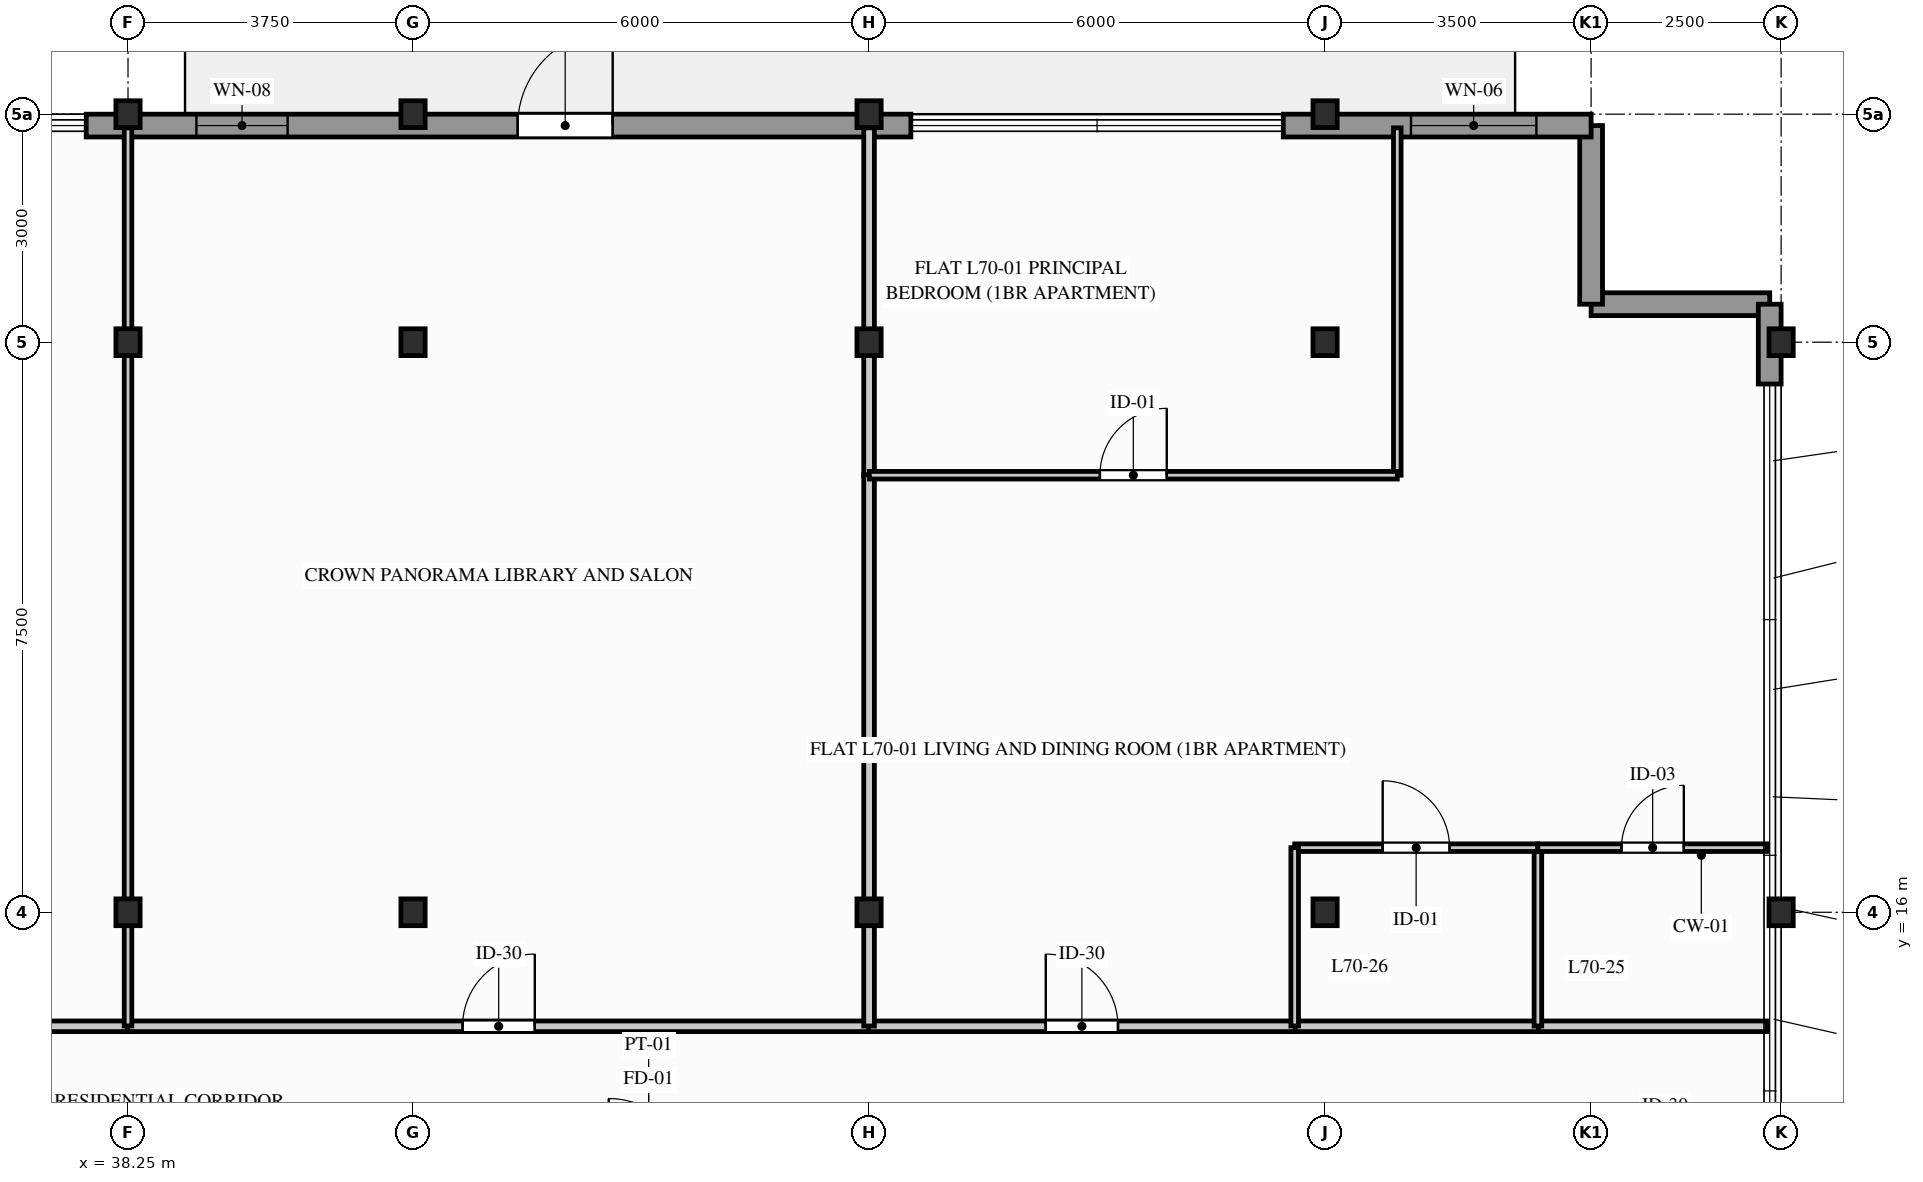
"""IFC4 building model, lengths in metres.
Left out: names, types, materials, properties, quantities, classifications, styles, units other than length and angle.
Written with IfcOpenShell. Run it as: python <this file> out.ifc"""

import sys

from ifc_helpers import new_model, si_unit, direction, frame, frame_2d, origin, origin_2d, place, context, subcontext, project, spatial, rectangle, i_section, extrude, element, fill, save


model = new_model("IFC4")
c1 = context("Model", 3, precision=1e-05, world=origin(), true_north=direction((0.0, 1.0)))
c2 = subcontext(c1, "Body", "Model", "MODEL_VIEW")
j1 = project(units=[si_unit("LENGTHUNIT", "METRE"), si_unit("PLANEANGLEUNIT", "RADIAN")], contexts=[c1])
p1 = place(None, origin())
s1 = spatial("IfcSite", under=j1, at=p1, CompositionType="ELEMENT")
p2 = place(p1, origin())
s2 = spatial("IfcBuilding", under=s1, at=p2, CompositionType="ELEMENT")
p3 = place(p2, frame((0.0, 0.0, 230.4)))
s3 = spatial("IfcBuildingStorey", under=s2, at=p3, CompositionType="ELEMENT", Elevation=230.4)
for number, where, z_axis, x_axis in (
    (1, (38.25, 16.0, 0.0), (0.0, 0.0, 1.0), (1.0, 0.0, 0.0)),
    (2, (38.25, 23.5, 0.0), (0.0, 0.0, 1.0), (1.0, 0.0, 0.0)),
    (3, (38.25, 26.5, 0.0), (0.0, 0.0, 1.0), (1.0, 0.0, 0.0)),
    (4, (42.0, 16.0, 0.0), (0.0, 0.0, 1.0), (1.0, 0.0, 0.0)),
    (5, (42.0, 23.5, 0.0), (0.0, 0.0, 1.0), (1.0, 0.0, 0.0)),
    (6, (42.0, 26.5, 0.0), (0.0, 0.0, 1.0), (1.0, 0.0, 0.0)),
    (7, (48.0, 16.0, 0.0), (0.0, 0.0, 1.0), (1.0, 0.0, 0.0)),
    (8, (48.0, 23.5, 0.0), (0.0, 0.0, 1.0), (1.0, 0.0, 0.0)),
    (9, (48.0, 26.5, 0.0), (0.0, 0.0, 1.0), (1.0, 0.0, 0.0)),
    (10, (54.0, 16.0, 0.0), (0.0, 0.0, 1.0), (1.0, 0.0, 0.0)),
    (11, (54.0, 23.5, 0.0), (0.0, 0.0, 1.0), (1.0, 0.0, 0.0)),
    (12, (54.0, 26.5, 0.0), (0.0, 0.0, 1.0), (1.0, 0.0, 0.0)),
    (13, (60.0, 16.0, 0.0), (0.0, 0.0, 1.0), (1.0, 0.0, 0.0)),
    (14, (60.0, 23.5, 0.0), (0.0, 0.0, 1.0), (1.0, 0.0, 0.0)),
):
    element("IfcColumn", number, at=place(p3, frame(where, z_axis=z_axis, x_axis=x_axis)), inside=s3, PredefinedType="COLUMN", context=c2, shape_type="SweptSolid", body=[
        extrude(i_section(OverallWidth=0.318, OverallDepth=0.353, WebThickness=0.023, FlangeThickness=0.038, FilletRadius=0.015, at=origin_2d()), origin(), (0.0, 0.0, 1.0), 3.1),
    ])
for number, where, z_axis, x_axis in (
    (15, (59.85, 24.0, 0.0), (0.0, 0.0, 1.0), (-1.0, 0.0, 0.0)),
    (16, (57.5, 24.0, 0.0), (0.0, 0.0, 1.0), (0.0, 1.0, 0.0)),
):
    element("IfcWall", number, at=place(p3, frame(where, z_axis=z_axis, x_axis=x_axis)), inside=s3, PredefinedType="STANDARD", context=c2, shape_type="SweptSolid", body=[
        extrude(rectangle(XDim=2.35, YDim=0.3, at=frame_2d((1.175, 0.0))), origin(), (0.0, 0.0, 1.0), 2.89),
    ])
p4 = place(p3, frame((59.85, 22.95, 0.0), z_axis=(0.0, 0.0, 1.0), x_axis=(0.0, 1.0, 0.0)))
e17 = element("IfcWall", 17, at=p4, inside=s3, PredefinedType="STANDARD", context=c2, shape_type="SweptSolid", body=[
    extrude(rectangle(XDim=1.05, YDim=0.3, at=frame_2d((0.525, 0.0))), origin(), (0.0, 0.0, 1.0), 2.89),
])
p5 = place(p3, frame((37.7, 26.35, 0.0), z_axis=(0.0, 0.0, 1.0), x_axis=(1.0, 0.0, 0.0)))
e18 = element("IfcWall", 18, at=p5, inside=s3, PredefinedType="STANDARD", context=c2, shape_type="SweptSolid", body=[
    extrude(rectangle(XDim=10.85, YDim=0.3, at=frame_2d((5.425, 0.0))), origin(), (0.0, 0.0, 1.0), 2.332),
])
p6 = place(p5, frame((5.677, 0.0, 0.0)))
e19 = element("IfcOpeningElement", 19, at=p6, cuts=e18, PredefinedType="OPENING", context=c2, shape_type="SweptSolid", body=[
    extrude(rectangle(XDim=1.25, YDim=2.2, at=frame_2d((0.625, 1.1))), frame((0.0, 0.16, 0.0), z_axis=(0.0, -1.0, 0.0), x_axis=(1.0, 0.0, 0.0)), (0.0, 0.0, 1.0), 0.32),
])
p7 = place(p5, frame((1.45, 0.0, 0.512)))
e20 = element("IfcOpeningElement", 20, at=p7, cuts=e18, PredefinedType="OPENING", context=c2, shape_type="SweptSolid", body=[
    extrude(rectangle(XDim=1.2, YDim=1.6, at=frame_2d((0.6, 0.8))), frame((0.0, 0.16, 0.0), z_axis=(0.0, -1.0, 0.0), x_axis=(1.0, 0.0, 0.0)), (0.0, 0.0, 1.0), 0.32),
])
p8 = place(p3, frame((53.45, 26.35, 0.0), z_axis=(0.0, 0.0, 1.0), x_axis=(1.0, 0.0, 0.0)))
e21 = element("IfcWall", 21, at=p8, inside=s3, PredefinedType="STANDARD", context=c2, shape_type="SweptSolid", body=[
    extrude(rectangle(XDim=4.05, YDim=0.3, at=frame_2d((2.025, 0.0))), origin(), (0.0, 0.0, 1.0), 2.89),
])
p9 = place(p8, frame((1.68, 0.0, 0.77)))
e22 = element("IfcOpeningElement", 22, at=p9, cuts=e21, PredefinedType="OPENING", context=c2, shape_type="SweptSolid", body=[
    extrude(rectangle(XDim=1.65, YDim=1.9, at=frame_2d((0.825, 0.95))), frame((0.0, 0.16, 0.0), z_axis=(0.0, -1.0, 0.0), x_axis=(1.0, 0.0, 0.0)), (0.0, 0.0, 1.0), 0.32),
])
p10 = place(p3, frame((27.43, 14.5, 0.0), z_axis=(0.0, 0.0, 1.0), x_axis=(1.0, 0.0, 0.0)))
e23 = element("IfcWall", 23, at=p10, inside=s3, PredefinedType="PARTITIONING", context=c2, shape_type="SweptSolid", body=[
    extrude(rectangle(XDim=10.831, YDim=0.14, at=frame_2d((5.416, 0.0))), origin(), (0.0, 0.0, 1.0), 2.326),
])
p11 = place(p10, frame((4.941, 0.0, 0.0)))
e24 = element("IfcOpeningElement", 24, at=p11, cuts=e23, PredefinedType="OPENING", context=c2, shape_type="SweptSolid", body=[
    extrude(rectangle(XDim=0.95, YDim=2.05, at=frame_2d((0.475, 1.025))), frame((0.0, 0.08, 0.0), z_axis=(0.0, -1.0, 0.0), x_axis=(1.0, 0.0, 0.0)), (0.0, 0.0, 1.0), 0.16),
])
p12 = place(p3, frame((38.243, 14.5, 0.0), z_axis=(0.0, 0.0, 1.0), x_axis=(1.0, 0.0, 0.0)))
e25 = element("IfcWall", 25, at=p12, inside=s3, PredefinedType="PARTITIONING", context=c2, shape_type="SweptSolid", body=[
    extrude(rectangle(XDim=9.769, YDim=0.14, at=frame_2d((4.884, 0.0))), origin(), (0.0, 0.0, 1.0), 2.326),
])
p13 = place(p12, frame((4.409, 0.0, 0.0)))
e26 = element("IfcOpeningElement", 26, at=p13, cuts=e25, PredefinedType="OPENING", context=c2, shape_type="SweptSolid", body=[
    extrude(rectangle(XDim=0.95, YDim=2.05, at=frame_2d((0.475, 1.025))), frame((0.0, 0.08, 0.0), z_axis=(0.0, -1.0, 0.0), x_axis=(1.0, 0.0, 0.0)), (0.0, 0.0, 1.0), 0.16),
])
p14 = place(p3, frame((56.789, 14.5, 0.0), z_axis=(0.0, 0.0, 1.0), x_axis=(1.0, 0.0, 0.0)))
e27 = element("IfcWall", 27, at=p14, inside=s3, PredefinedType="PARTITIONING", context=c2, shape_type="SweptSolid", body=[
    extrude(rectangle(XDim=3.031, YDim=0.14, at=frame_2d((1.516, 0.0))), origin(), (0.0, 0.0, 1.0), 2.89),
])
p15 = place(p3, frame((53.589, 14.5, 0.0), z_axis=(0.0, 0.0, 1.0), x_axis=(1.0, 0.0, 0.0)))
e28 = element("IfcWall", 28, at=p15, inside=s3, PredefinedType="PARTITIONING", context=c2, shape_type="SweptSolid", body=[
    extrude(rectangle(XDim=3.219, YDim=0.14, at=frame_2d((1.609, 0.0))), origin(), (0.0, 0.0, 1.0), 2.326),
])
p16 = place(p3, frame((47.993, 14.5, 0.0), z_axis=(0.0, 0.0, 1.0), x_axis=(1.0, 0.0, 0.0)))
e29 = element("IfcWall", 29, at=p16, inside=s3, PredefinedType="PARTITIONING", context=c2, shape_type="SweptSolid", body=[
    extrude(rectangle(XDim=5.615, YDim=0.14, at=frame_2d((2.807, 0.0))), origin(), (0.0, 0.0, 1.0), 2.326),
])
p17 = place(p16, frame((2.332, 0.0, 0.0)))
e30 = element("IfcOpeningElement", 30, at=p17, cuts=e29, PredefinedType="OPENING", context=c2, shape_type="SweptSolid", body=[
    extrude(rectangle(XDim=0.95, YDim=2.05, at=frame_2d((0.475, 1.025))), frame((0.0, 0.08, 0.0), z_axis=(0.0, -1.0, 0.0), x_axis=(1.0, 0.0, 0.0)), (0.0, 0.0, 1.0), 0.16),
])
p18 = place(p3, frame((38.25, 14.504, 0.0), z_axis=(0.0, 0.0, 1.0), x_axis=(0.0, 1.0, 0.0)))
e31 = element("IfcWall", 31, at=p18, inside=s3, PredefinedType="PARTITIONING", context=c2, shape_type="SweptSolid", body=[
    extrude(rectangle(XDim=11.816, YDim=0.1, at=frame_2d((5.908, 0.0))), origin(), (0.0, 0.0, 1.0), 2.326),
])
p19 = place(p3, frame((48.0, 21.739, 0.0), z_axis=(0.0, 0.0, 1.0), x_axis=(0.0, 1.0, 0.0)))
e32 = element("IfcWall", 32, at=p19, inside=s3, PredefinedType="PARTITIONING", context=c2, shape_type="SweptSolid", body=[
    extrude(rectangle(XDim=4.581, YDim=0.14, at=frame_2d((2.291, 0.0))), origin(), (0.0, 0.0, 1.0), 2.326),
])
p20 = place(p3, frame((48.0, 14.504, 0.0), z_axis=(0.0, 0.0, 1.0), x_axis=(0.0, 1.0, 0.0)))
e33 = element("IfcWall", 33, at=p20, inside=s3, PredefinedType="PARTITIONING", context=c2, shape_type="SweptSolid", body=[
    extrude(rectangle(XDim=7.253, YDim=0.14, at=frame_2d((3.627, 0.0))), origin(), (0.0, 0.0, 1.0), 2.326),
])
p21 = place(p3, frame((56.8, 14.504, 0.0), z_axis=(0.0, 0.0, 1.0), x_axis=(0.0, 1.0, 0.0)))
e34 = element("IfcWall", 34, at=p21, inside=s3, PredefinedType="PARTITIONING", context=c2, shape_type="SweptSolid", body=[
    extrude(rectangle(XDim=2.346, YDim=0.1, at=frame_2d((1.173, 0.0))), origin(), (0.0, 0.0, 1.0), 2.326),
])
p22 = place(p3, frame((56.8, 16.85, 0.0), z_axis=(0.0, 0.0, 1.0), x_axis=(1.0, 0.0, 0.0)))
e35 = element("IfcWall", 35, at=p22, inside=s3, PredefinedType="PARTITIONING", context=c2, shape_type="SweptSolid", body=[
    extrude(rectangle(XDim=3.02, YDim=0.1, at=frame_2d((1.51, 0.0))), origin(), (0.0, 0.0, 1.0), 2.89),
])
p23 = place(p22, frame((1.1, 0.0, 0.0)))
e36 = element("IfcOpeningElement", 36, at=p23, cuts=e35, PredefinedType="OPENING", context=c2, shape_type="SweptSolid", body=[
    extrude(rectangle(XDim=0.82, YDim=2.02, at=frame_2d((0.41, 1.01))), frame((0.0, 0.06, 0.0), z_axis=(0.0, -1.0, 0.0), x_axis=(1.0, 0.0, 0.0)), (0.0, 0.0, 1.0), 0.12),
])
p24 = place(p3, frame((53.6, 16.85, 0.0), z_axis=(0.0, 0.0, 1.0), x_axis=(1.0, 0.0, 0.0)))
e37 = element("IfcWall", 37, at=p24, inside=s3, PredefinedType="PARTITIONING", context=c2, shape_type="SweptSolid", body=[
    extrude(rectangle(XDim=3.196, YDim=0.1, at=frame_2d((1.598, 0.0))), origin(), (0.0, 0.0, 1.0), 2.326),
])
p25 = place(p24, frame((1.158, 0.0, 0.0)))
e38 = element("IfcOpeningElement", 38, at=p25, cuts=e37, PredefinedType="OPENING", context=c2, shape_type="SweptSolid", body=[
    extrude(rectangle(XDim=0.88, YDim=2.04, at=frame_2d((0.44, 1.02))), frame((0.0, 0.06, 0.0), z_axis=(0.0, -1.0, 0.0), x_axis=(1.0, 0.0, 0.0)), (0.0, 0.0, 1.0), 0.12),
])
p26 = place(p3, frame((53.6, 14.504, 0.0), z_axis=(0.0, 0.0, 1.0), x_axis=(0.0, 1.0, 0.0)))
e39 = element("IfcWall", 39, at=p26, inside=s3, PredefinedType="PARTITIONING", context=c2, shape_type="SweptSolid", body=[
    extrude(rectangle(XDim=2.346, YDim=0.1, at=frame_2d((1.173, 0.0))), origin(), (0.0, 0.0, 1.0), 2.326),
])
p27 = place(p3, frame((54.95, 21.75, 0.0), z_axis=(0.0, 0.0, 1.0), x_axis=(0.0, 1.0, 0.0)))
e40 = element("IfcWall", 40, at=p27, inside=s3, PredefinedType="PARTITIONING", context=c2, shape_type="SweptSolid", body=[
    extrude(rectangle(XDim=4.57, YDim=0.1, at=frame_2d((2.285, 0.0))), origin(), (0.0, 0.0, 1.0), 2.326),
])
p28 = place(p3, frame((48.004, 21.75, 0.0), z_axis=(0.0, 0.0, 1.0), x_axis=(1.0, 0.0, 0.0)))
e41 = element("IfcWall", 41, at=p28, inside=s3, PredefinedType="PARTITIONING", context=c2, shape_type="SweptSolid", body=[
    extrude(rectangle(XDim=6.946, YDim=0.1, at=frame_2d((3.473, 0.0))), origin(), (0.0, 0.0, 1.0), 2.326),
])
p29 = place(p28, frame((3.033, 0.0, 0.0)))
e42 = element("IfcOpeningElement", 42, at=p29, cuts=e41, PredefinedType="OPENING", context=c2, shape_type="SweptSolid", body=[
    extrude(rectangle(XDim=0.88, YDim=2.04, at=frame_2d((0.44, 1.02))), frame((0.0, 0.06, 0.0), z_axis=(0.0, -1.0, 0.0), x_axis=(1.0, 0.0, 0.0)), (0.0, 0.0, 1.0), 0.12),
])
p30 = place(p6, origin())
e43 = element("IfcDoor", 43, at=p30, inside=s3, OperationType="SINGLE_SWING_RIGHT", PredefinedType="DOOR", context=c2, shape_type="SweptSolid", body=[
    extrude(rectangle(XDim=1.25, YDim=2.2, at=frame_2d((0.625, 1.1))), frame((0.0, 0.025, 0.0), z_axis=(0.0, -1.0, 0.0), x_axis=(1.0, 0.0, 0.0)), (0.0, 0.0, 1.0), 0.05),
])
fill(e19, e43)
p31 = place(p7, origin())
e44 = element("IfcWindow", 44, at=p31, inside=s3, PartitioningType="SINGLE_PANEL", PredefinedType="WINDOW", context=c2, shape_type="SweptSolid", body=[
    extrude(rectangle(XDim=1.2, YDim=1.6, at=frame_2d((0.6, 0.8))), frame((0.0, 0.03, 0.0), z_axis=(0.0, -1.0, 0.0), x_axis=(1.0, 0.0, 0.0)), (0.0, 0.0, 1.0), 0.06),
])
fill(e20, e44)
p32 = place(p9, origin())
e45 = element("IfcWindow", 45, at=p32, inside=s3, PartitioningType="SINGLE_PANEL", PredefinedType="WINDOW", context=c2, shape_type="SweptSolid", body=[
    extrude(rectangle(XDim=1.65, YDim=1.9, at=frame_2d((0.825, 0.95))), frame((0.0, 0.03, 0.0), z_axis=(0.0, -1.0, 0.0), x_axis=(1.0, 0.0, 0.0)), (0.0, 0.0, 1.0), 0.06),
])
fill(e22, e45)
p33 = place(p13, origin())
e46 = element("IfcDoor", 46, at=p33, inside=s3, OperationType="SINGLE_SWING_RIGHT", PredefinedType="DOOR", context=c2, shape_type="SweptSolid", body=[
    extrude(rectangle(XDim=0.95, YDim=2.05, at=frame_2d((0.475, 1.025))), frame((0.0, 0.025, 0.0), z_axis=(0.0, -1.0, 0.0), x_axis=(1.0, 0.0, 0.0)), (0.0, 0.0, 1.0), 0.05),
])
fill(e26, e46)
p34 = place(p17, origin())
e47 = element("IfcDoor", 47, at=p34, inside=s3, OperationType="SINGLE_SWING_LEFT", PredefinedType="DOOR", context=c2, shape_type="SweptSolid", body=[
    extrude(rectangle(XDim=0.95, YDim=2.05, at=frame_2d((0.475, 1.025))), frame((0.0, 0.025, 0.0), z_axis=(0.0, -1.0, 0.0), x_axis=(1.0, 0.0, 0.0)), (0.0, 0.0, 1.0), 0.05),
])
fill(e30, e47)
p35 = place(p23, origin())
e48 = element("IfcDoor", 48, at=p35, inside=s3, OperationType="SINGLE_SWING_RIGHT", PredefinedType="DOOR", context=c2, shape_type="SweptSolid", body=[
    extrude(rectangle(XDim=0.82, YDim=2.02, at=frame_2d((0.41, 1.01))), frame((0.0, 0.025, 0.0), z_axis=(0.0, -1.0, 0.0), x_axis=(1.0, 0.0, 0.0)), (0.0, 0.0, 1.0), 0.05),
])
fill(e36, e48)
p36 = place(p25, origin())
e49 = element("IfcDoor", 49, at=p36, inside=s3, OperationType="SINGLE_SWING_LEFT", PredefinedType="DOOR", context=c2, shape_type="SweptSolid", body=[
    extrude(rectangle(XDim=0.88, YDim=2.04, at=frame_2d((0.44, 1.02))), frame((0.0, 0.025, 0.0), z_axis=(0.0, -1.0, 0.0), x_axis=(1.0, 0.0, 0.0)), (0.0, 0.0, 1.0), 0.05),
])
fill(e38, e49)
p37 = place(p29, origin())
e50 = element("IfcDoor", 50, at=p37, inside=s3, OperationType="SINGLE_SWING_RIGHT", PredefinedType="DOOR", context=c2, shape_type="SweptSolid", body=[
    extrude(rectangle(XDim=0.88, YDim=2.04, at=frame_2d((0.44, 1.02))), frame((0.0, 0.025, 0.0), z_axis=(0.0, -1.0, 0.0), x_axis=(1.0, 0.0, 0.0)), (0.0, 0.0, 1.0), 0.05),
])
fill(e42, e50)
save(model, sys.argv[1])
